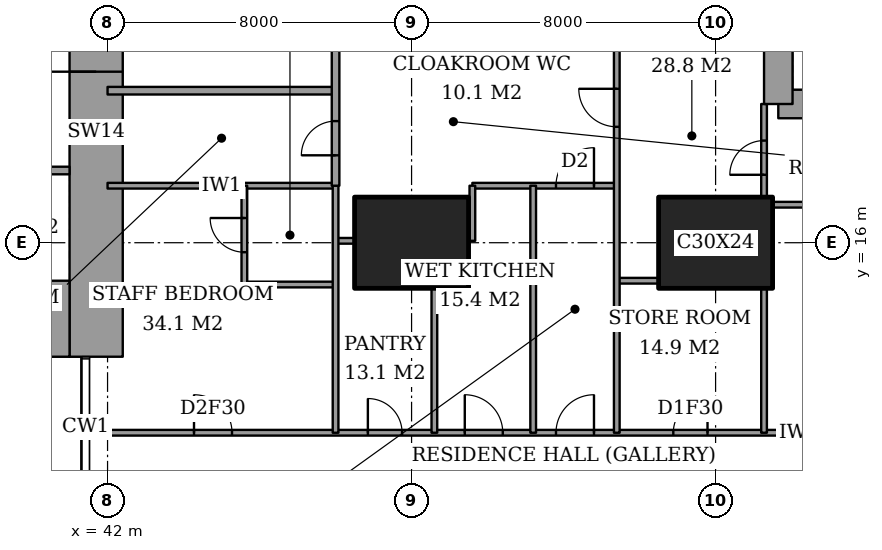
"""IFC4 building model, lengths in metres.
Left out: names, types, materials, properties, quantities, classifications, styles, units other than length and angle.
Written with IfcOpenShell. Run it as: python <this file> out.ifc"""

import sys

from ifc_helpers import new_model, si_unit, direction, frame, frame_2d, origin, origin_2d, place, context, subcontext, project, spatial, rectangle, extrude, element, fill, save


model = new_model("IFC4")
c1 = context("Model", 3, precision=1e-05, world=origin(), true_north=direction((0.0, 1.0)))
c2 = subcontext(c1, "Body", "Model", "MODEL_VIEW")
j1 = project(units=[si_unit("LENGTHUNIT", "METRE"), si_unit("PLANEANGLEUNIT", "RADIAN")], contexts=[c1])
p1 = place(None, origin())
s1 = spatial("IfcSite", under=j1, at=p1, CompositionType="ELEMENT")
p2 = place(p1, origin())
s2 = spatial("IfcBuilding", under=s1, at=p2, CompositionType="ELEMENT")
p3 = place(p2, frame((0.0, 0.0, 230.4)))
s3 = spatial("IfcBuildingStorey", under=s2, at=p3, CompositionType="ELEMENT", Elevation=230.4)
for number, where, z_axis, x_axis in (
    (1, (50.0, 16.0, 0.0), (0.0, 0.0, 1.0), (1.0, 0.0, 0.0)),
    (2, (58.0, 16.0, 0.0), (0.0, 0.0, 1.0), (1.0, 0.0, 0.0)),
):
    element("IfcColumn", number, at=place(p3, frame(where, z_axis=z_axis, x_axis=x_axis)), inside=s3, PredefinedType="COLUMN", context=c2, shape_type="SweptSolid", body=[
        extrude(rectangle(XDim=3.0, YDim=2.4, at=origin_2d()), origin(), (0.0, 0.0, 1.0), 3.6),
    ])
p4 = place(p3, frame((37.85, 14.0, 0.0), z_axis=(0.0, 0.0, 1.0), x_axis=(1.0, 0.0, 0.0)))
e3 = element("IfcWall", 3, at=p4, inside=s3, PredefinedType="SHEAR", context=c2, shape_type="SweptSolid", body=[
    extrude(rectangle(XDim=3.15, YDim=2.0, at=frame_2d((1.575, 0.0))), origin(), (0.0, 0.0, 1.0), 3.6),
])
p5 = place(p3, frame((41.7, 13.0, 0.0), z_axis=(0.0, 0.0, 1.0), x_axis=(0.0, 1.0, 0.0)))
e4 = element("IfcWall", 4, at=p5, inside=s3, PredefinedType="SHEAR", context=c2, shape_type="SweptSolid", body=[
    extrude(rectangle(XDim=11.85, YDim=1.4, at=frame_2d((5.925, 0.0))), origin(), (0.0, 0.0, 1.0), 3.6),
])
p6 = place(p5, frame((7.5, 0.0, 0.0)))
e5 = element("IfcOpeningElement", 5, at=p6, cuts=e4, PredefinedType="OPENING", context=c2, shape_type="SweptSolid", body=[
    extrude(rectangle(XDim=1.8, YDim=2.4, at=frame_2d((0.9, 1.2))), frame((0.0, 0.71, 0.0), z_axis=(0.0, -1.0, 0.0), x_axis=(1.0, 0.0, 0.0)), (0.0, 0.0, 1.0), 1.42),
])
p7 = place(p3, frame((59.65, 19.65, 0.0), z_axis=(0.0, 0.0, 1.0), x_axis=(1.0, 0.0, 0.0)))
e6 = element("IfcWall", 6, at=p7, inside=s3, PredefinedType="SHEAR", context=c2, shape_type="SweptSolid", body=[
    extrude(rectangle(XDim=4.45, YDim=0.75, at=frame_2d((2.225, 0.0))), origin(), (0.0, 0.0, 1.0), 3.6),
])
p8 = place(p3, frame((59.65, 28.35, 0.0), z_axis=(0.0, 0.0, 1.0), x_axis=(0.0, -1.0, 0.0)))
e7 = element("IfcWall", 7, at=p8, inside=s3, PredefinedType="SHEAR", context=c2, shape_type="SweptSolid", body=[
    extrude(rectangle(XDim=8.7, YDim=0.75, at=frame_2d((4.35, 0.0))), origin(), (0.0, 0.0, 1.0), 3.6),
])
p9 = place(p8, frame((0.975, 0.0, 0.0)))
e8 = element("IfcOpeningElement", 8, at=p9, cuts=e7, PredefinedType="OPENING", context=c2, shape_type="SweptSolid", body=[
    extrude(rectangle(XDim=1.0, YDim=2.1, at=frame_2d((0.5, 1.05))), frame((0.0, 0.385, 0.0), z_axis=(0.0, -1.0, 0.0), x_axis=(1.0, 0.0, 0.0)), (0.0, 0.0, 1.0), 0.77),
])
p10 = place(p3, frame((41.439, 11.0, 0.0), z_axis=(0.0, 0.0, 1.0), x_axis=(1.0, 0.0, 0.0)))
e9 = element("IfcWall", 9, at=p10, inside=s3, PredefinedType="PARTITIONING", context=c2, shape_type="SweptSolid", body=[
    extrude(rectangle(XDim=25.011, YDim=0.15, at=frame_2d((12.505, 0.0))), origin(), (0.0, 0.0, 1.0), 3.35),
])
p11 = place(p10, frame((12.361, 0.0, 0.0)))
e10 = element("IfcOpeningElement", 10, at=p11, cuts=e9, PredefinedType="OPENING", context=c2, shape_type="SweptSolid", body=[
    extrude(rectangle(XDim=1.0, YDim=2.1, at=frame_2d((0.5, 1.05))), frame((0.0, 0.085, 0.0), z_axis=(0.0, -1.0, 0.0), x_axis=(1.0, 0.0, 0.0)), (0.0, 0.0, 1.0), 0.17),
])
p12 = place(p10, frame((20.924, 0.0, 0.0)))
e11 = element("IfcOpeningElement", 11, at=p12, cuts=e9, PredefinedType="OPENING", context=c2, shape_type="SweptSolid", body=[
    extrude(rectangle(XDim=1.0, YDim=2.1, at=frame_2d((0.5, 1.05))), frame((0.0, 0.085, 0.0), z_axis=(0.0, -1.0, 0.0), x_axis=(1.0, 0.0, 0.0)), (0.0, 0.0, 1.0), 0.17),
])
p13 = place(p10, frame((15.448, 0.0, 0.0)))
e12 = element("IfcOpeningElement", 12, at=p13, cuts=e9, PredefinedType="OPENING", context=c2, shape_type="SweptSolid", body=[
    extrude(rectangle(XDim=0.9, YDim=2.1, at=frame_2d((0.45, 1.05))), frame((0.0, 0.085, 0.0), z_axis=(0.0, -1.0, 0.0), x_axis=(1.0, 0.0, 0.0)), (0.0, 0.0, 1.0), 0.17),
])
p14 = place(p10, frame((9.961, 0.0, 0.0)))
e13 = element("IfcOpeningElement", 13, at=p14, cuts=e9, PredefinedType="OPENING", context=c2, shape_type="SweptSolid", body=[
    extrude(rectangle(XDim=1.0, YDim=2.1, at=frame_2d((0.5, 1.05))), frame((0.0, 0.085, 0.0), z_axis=(0.0, -1.0, 0.0), x_axis=(1.0, 0.0, 0.0)), (0.0, 0.0, 1.0), 0.17),
])
p15 = place(p10, frame((7.411, 0.0, 0.0)))
e14 = element("IfcOpeningElement", 14, at=p15, cuts=e9, PredefinedType="OPENING", context=c2, shape_type="SweptSolid", body=[
    extrude(rectangle(XDim=0.9, YDim=2.1, at=frame_2d((0.45, 1.05))), frame((0.0, 0.085, 0.0), z_axis=(0.0, -1.0, 0.0), x_axis=(1.0, 0.0, 0.0)), (0.0, 0.0, 1.0), 0.17),
])
p16 = place(p10, frame((2.836, 0.0, 0.0)))
e15 = element("IfcOpeningElement", 15, at=p16, cuts=e9, PredefinedType="OPENING", context=c2, shape_type="SweptSolid", body=[
    extrude(rectangle(XDim=1.0, YDim=2.1, at=frame_2d((0.5, 1.05))), frame((0.0, 0.085, 0.0), z_axis=(0.0, -1.0, 0.0), x_axis=(1.0, 0.0, 0.0)), (0.0, 0.0, 1.0), 0.17),
])
p17 = place(p3, frame((45.6, 14.9, 0.0), z_axis=(0.0, 0.0, 1.0), x_axis=(1.0, 0.0, 0.0)))
e16 = element("IfcWall", 16, at=p17, inside=s3, PredefinedType="PARTITIONING", context=c2, shape_type="SweptSolid", body=[
    extrude(rectangle(XDim=2.4, YDim=0.15, at=frame_2d((1.2, 0.0))), origin(), (0.0, 0.0, 1.0), 3.35),
])
p18 = place(p3, frame((55.4, 15.0, 0.0), z_axis=(0.0, 0.0, 1.0), x_axis=(1.0, 0.0, 0.0)))
e17 = element("IfcWall", 17, at=p18, inside=s3, PredefinedType="PARTITIONING", context=c2, shape_type="SweptSolid", body=[
    extrude(rectangle(XDim=1.1, YDim=0.15, at=frame_2d((0.55, 0.0))), origin(), (0.0, 0.0, 1.0), 3.35),
])
p19 = place(p3, frame((48.0, 16.05, 0.0), z_axis=(0.0, 0.0, 1.0), x_axis=(1.0, 0.0, 0.0)))
e18 = element("IfcWall", 18, at=p19, inside=s3, PredefinedType="PARTITIONING", context=c2, shape_type="SweptSolid", body=[
    extrude(rectangle(XDim=0.5, YDim=0.15, at=frame_2d((0.25, 0.0))), origin(), (0.0, 0.0, 1.0), 2.634),
])
p20 = place(p3, frame((59.5, 17.0, 0.0), z_axis=(0.0, 0.0, 1.0), x_axis=(1.0, 0.0, 0.0)))
e19 = element("IfcWall", 19, at=p20, inside=s3, PredefinedType="PARTITIONING", context=c2, shape_type="SweptSolid", body=[
    extrude(rectangle(XDim=6.95, YDim=0.15, at=frame_2d((3.475, 0.0))), origin(), (0.0, 0.0, 1.0), 3.35),
])
p21 = place(p3, frame((42.0, 17.5, 0.0), z_axis=(0.0, 0.0, 1.0), x_axis=(1.0, 0.0, 0.0)))
e20 = element("IfcWall", 20, at=p21, inside=s3, PredefinedType="PARTITIONING", context=c2, shape_type="SweptSolid", body=[
    extrude(rectangle(XDim=6.0, YDim=0.15, at=frame_2d((3.0, 0.0))), origin(), (0.0, 0.0, 1.0), 3.35),
])
p22 = place(p3, frame((51.6, 17.5, 0.0), z_axis=(0.0, 0.0, 1.0), x_axis=(1.0, 0.0, 0.0)))
e21 = element("IfcWall", 21, at=p22, inside=s3, PredefinedType="PARTITIONING", context=c2, shape_type="SweptSolid", body=[
    extrude(rectangle(XDim=3.8, YDim=0.15, at=frame_2d((1.9, 0.0))), origin(), (0.0, 0.0, 1.0), 3.35),
])
p23 = place(p22, frame((2.2, 0.0, 0.0)))
e22 = element("IfcOpeningElement", 22, at=p23, cuts=e21, PredefinedType="OPENING", context=c2, shape_type="SweptSolid", body=[
    extrude(rectangle(XDim=1.0, YDim=2.1, at=frame_2d((0.5, 1.05))), frame((0.0, 0.085, 0.0), z_axis=(0.0, -1.0, 0.0), x_axis=(1.0, 0.0, 0.0)), (0.0, 0.0, 1.0), 0.17),
])
p24 = place(p3, frame((42.0, 20.0, 0.0), z_axis=(0.0, 0.0, 1.0), x_axis=(1.0, 0.0, 0.0)))
e23 = element("IfcWall", 23, at=p24, inside=s3, PredefinedType="PARTITIONING", context=c2, shape_type="SweptSolid", body=[
    extrude(rectangle(XDim=6.0, YDim=0.2, at=frame_2d((3.0, 0.0))), origin(), (0.0, 0.0, 1.0), 3.35),
])
p25 = place(p3, frame((45.6, 14.9, 0.0), z_axis=(0.0, 0.0, 1.0), x_axis=(0.0, 1.0, 0.0)))
e24 = element("IfcWall", 24, at=p25, inside=s3, PredefinedType="PARTITIONING", context=c2, shape_type="SweptSolid", body=[
    extrude(rectangle(XDim=2.6, YDim=0.15, at=frame_2d((1.3, 0.0))), origin(), (0.0, 0.0, 1.0), 3.35),
])
p26 = place(p25, frame((0.85, 0.0, 0.0)))
e25 = element("IfcOpeningElement", 25, at=p26, cuts=e24, PredefinedType="OPENING", context=c2, shape_type="SweptSolid", body=[
    extrude(rectangle(XDim=0.9, YDim=2.1, at=frame_2d((0.45, 1.05))), frame((0.0, 0.085, 0.0), z_axis=(0.0, -1.0, 0.0), x_axis=(1.0, 0.0, 0.0)), (0.0, 0.0, 1.0), 0.17),
])
p27 = place(p3, frame((48.0, 17.5, 0.0), z_axis=(0.0, 0.0, 1.0), x_axis=(0.0, 1.0, 0.0)))
e26 = element("IfcWall", 26, at=p27, inside=s3, PredefinedType="PARTITIONING", context=c2, shape_type="SweptSolid", body=[
    extrude(rectangle(XDim=6.5, YDim=0.2, at=frame_2d((3.25, 0.0))), origin(), (0.0, 0.0, 1.0), 3.35),
])
p28 = place(p27, frame((3.9, 0.0, 0.0)))
e27 = element("IfcOpeningElement", 27, at=p28, cuts=e26, PredefinedType="OPENING", context=c2, shape_type="SweptSolid", body=[
    extrude(rectangle(XDim=1.2, YDim=2.4, at=frame_2d((0.6, 1.2))), frame((0.0, 0.11, 0.0), z_axis=(0.0, -1.0, 0.0), x_axis=(1.0, 0.0, 0.0)), (0.0, 0.0, 1.0), 0.22),
])
p29 = place(p27, frame((0.8, 0.0, 0.0)))
e28 = element("IfcOpeningElement", 28, at=p29, cuts=e26, PredefinedType="OPENING", context=c2, shape_type="SweptSolid", body=[
    extrude(rectangle(XDim=0.9, YDim=2.1, at=frame_2d((0.45, 1.05))), frame((0.0, 0.11, 0.0), z_axis=(0.0, -1.0, 0.0), x_axis=(1.0, 0.0, 0.0)), (0.0, 0.0, 1.0), 0.22),
])
p30 = place(p3, frame((48.0, 11.0, 0.0), z_axis=(0.0, 0.0, 1.0), x_axis=(0.0, 1.0, 0.0)))
e29 = element("IfcWall", 29, at=p30, inside=s3, PredefinedType="PARTITIONING", context=c2, shape_type="SweptSolid", body=[
    extrude(rectangle(XDim=6.5, YDim=0.15, at=frame_2d((3.25, 0.0))), origin(), (0.0, 0.0, 1.0), 3.35),
])
p31 = place(p3, frame((50.6, 11.0, 0.0), z_axis=(0.0, 0.0, 1.0), x_axis=(0.0, 1.0, 0.0)))
e30 = element("IfcWall", 30, at=p31, inside=s3, PredefinedType="PARTITIONING", context=c2, shape_type="SweptSolid", body=[
    extrude(rectangle(XDim=3.8, YDim=0.15, at=frame_2d((1.9, 0.0))), origin(), (0.0, 0.0, 1.0), 3.35),
])
p32 = place(p3, frame((51.6, 16.05, 0.0), z_axis=(0.0, 0.0, 1.0), x_axis=(0.0, 1.0, 0.0)))
e31 = element("IfcWall", 31, at=p32, inside=s3, PredefinedType="PARTITIONING", context=c2, shape_type="SweptSolid", body=[
    extrude(rectangle(XDim=1.45, YDim=0.15, at=frame_2d((0.725, 0.0))), origin(), (0.0, 0.0, 1.0), 3.35),
])
p33 = place(p3, frame((53.2, 11.0, 0.0), z_axis=(0.0, 0.0, 1.0), x_axis=(0.0, 1.0, 0.0)))
e32 = element("IfcWall", 32, at=p33, inside=s3, PredefinedType="PARTITIONING", context=c2, shape_type="SweptSolid", body=[
    extrude(rectangle(XDim=6.5, YDim=0.15, at=frame_2d((3.25, 0.0))), origin(), (0.0, 0.0, 1.0), 3.35),
])
p34 = place(p3, frame((55.4, 11.0, 0.0), z_axis=(0.0, 0.0, 1.0), x_axis=(0.0, 1.0, 0.0)))
e33 = element("IfcWall", 33, at=p34, inside=s3, PredefinedType="PARTITIONING", context=c2, shape_type="SweptSolid", body=[
    extrude(rectangle(XDim=10.6, YDim=0.15, at=frame_2d((5.3, 0.0))), origin(), (0.0, 0.0, 1.0), 3.35),
])
p35 = place(p34, frame((8.05, 0.0, 0.0)))
e34 = element("IfcOpeningElement", 34, at=p35, cuts=e33, PredefinedType="OPENING", context=c2, shape_type="SweptSolid", body=[
    extrude(rectangle(XDim=1.0, YDim=2.1, at=frame_2d((0.5, 1.05))), frame((0.0, 0.085, 0.0), z_axis=(0.0, -1.0, 0.0), x_axis=(1.0, 0.0, 0.0)), (0.0, 0.0, 1.0), 0.17),
])
p36 = place(p3, frame((59.275, 11.0, 0.0), z_axis=(0.0, 0.0, 1.0), x_axis=(0.0, 1.0, 0.0)))
e35 = element("IfcWall", 35, at=p36, inside=s3, PredefinedType="PARTITIONING", context=c2, shape_type="SweptSolid", body=[
    extrude(rectangle(XDim=3.8, YDim=0.15, at=frame_2d((1.9, 0.0))), origin(), (0.0, 0.0, 1.0), 3.35),
])
p37 = place(p3, frame((59.275, 17.2, 0.0), z_axis=(0.0, 0.0, 1.0), x_axis=(0.0, 1.0, 0.0)))
e36 = element("IfcWall", 36, at=p37, inside=s3, PredefinedType="PARTITIONING", context=c2, shape_type="SweptSolid", body=[
    extrude(rectangle(XDim=2.45, YDim=0.15, at=frame_2d((1.225, 0.0))), origin(), (0.0, 0.0, 1.0), 3.35),
])
p38 = place(p37, frame((0.587, 0.0, 0.0)))
e37 = element("IfcOpeningElement", 37, at=p38, cuts=e36, PredefinedType="OPENING", context=c2, shape_type="SweptSolid", body=[
    extrude(rectangle(XDim=0.9, YDim=2.1, at=frame_2d((0.45, 1.05))), frame((0.0, 0.085, 0.0), z_axis=(0.0, -1.0, 0.0), x_axis=(1.0, 0.0, 0.0)), (0.0, 0.0, 1.0), 0.17),
])
p39 = place(p3, frame((28.3, 17.9, 0.0), z_axis=(0.0, 0.0, 1.0), x_axis=(1.0, 0.0, 0.0)))
e38 = element("IfcWall", 38, at=p39, inside=s3, PredefinedType="PARTITIONING", context=c2, shape_type="SweptSolid", body=[
    extrude(rectangle(XDim=12.7, YDim=0.2, at=frame_2d((6.35, 0.0))), origin(), (0.0, 0.0, 1.0), 3.6),
])
p40 = place(p39, frame((1.05, 0.0, 0.0)))
e39 = element("IfcOpeningElement", 39, at=p40, cuts=e38, PredefinedType="OPENING", context=c2, shape_type="SweptSolid", body=[
    extrude(rectangle(XDim=0.9, YDim=2.1, at=frame_2d((0.45, 1.05))), frame((0.0, 0.11, 0.0), z_axis=(0.0, -1.0, 0.0), x_axis=(1.0, 0.0, 0.0)), (0.0, 0.0, 1.0), 0.22),
])
p41 = place(p39, frame((4.25, 0.0, 0.0)))
e40 = element("IfcOpeningElement", 40, at=p41, cuts=e38, PredefinedType="OPENING", context=c2, shape_type="SweptSolid", body=[
    extrude(rectangle(XDim=0.9, YDim=2.1, at=frame_2d((0.45, 1.05))), frame((0.0, 0.11, 0.0), z_axis=(0.0, -1.0, 0.0), x_axis=(1.0, 0.0, 0.0)), (0.0, 0.0, 1.0), 0.22),
])
p42 = place(p39, frame((10.6, 0.0, 0.0)))
e41 = element("IfcOpeningElement", 41, at=p42, cuts=e38, PredefinedType="OPENING", context=c2, shape_type="SweptSolid", body=[
    extrude(rectangle(XDim=1.2, YDim=2.1, at=frame_2d((0.6, 1.05))), frame((0.0, 0.11, 0.0), z_axis=(0.0, -1.0, 0.0), x_axis=(1.0, 0.0, 0.0)), (0.0, 0.0, 1.0), 0.22),
])
p43 = place(p11, origin())
e42 = element("IfcDoor", 42, at=p43, inside=s3, OperationType="SINGLE_SWING_LEFT", PredefinedType="DOOR", context=c2, shape_type="SweptSolid", body=[
    extrude(rectangle(XDim=1.0, YDim=2.1, at=frame_2d((0.5, 1.05))), frame((0.0, 0.025, 0.0), z_axis=(0.0, -1.0, 0.0), x_axis=(1.0, 0.0, 0.0)), (0.0, 0.0, 1.0), 0.05),
])
fill(e10, e42)
p44 = place(p38, origin())
e43 = element("IfcDoor", 43, at=p44, inside=s3, OperationType="SINGLE_SWING_RIGHT", PredefinedType="DOOR", context=c2, shape_type="SweptSolid", body=[
    extrude(rectangle(XDim=0.9, YDim=2.1, at=frame_2d((0.45, 1.05))), frame((0.0, 0.025, 0.0), z_axis=(0.0, -1.0, 0.0), x_axis=(1.0, 0.0, 0.0)), (0.0, 0.0, 1.0), 0.05),
])
fill(e37, e43)
p45 = place(p13, origin())
e44 = element("IfcDoor", 44, at=p45, inside=s3, OperationType="SINGLE_SWING_LEFT", PredefinedType="DOOR", context=c2, shape_type="SweptSolid", body=[
    extrude(rectangle(XDim=0.9, YDim=2.1, at=frame_2d((0.45, 1.05))), frame((0.0, 0.025, 0.0), z_axis=(0.0, -1.0, 0.0), x_axis=(1.0, 0.0, 0.0)), (0.0, 0.0, 1.0), 0.05),
])
fill(e12, e44)
p46 = place(p35, origin())
e45 = element("IfcDoor", 45, at=p46, inside=s3, OperationType="SINGLE_SWING_LEFT", PredefinedType="DOOR", context=c2, shape_type="SweptSolid", body=[
    extrude(rectangle(XDim=1.0, YDim=2.1, at=frame_2d((0.5, 1.05))), frame((0.0, 0.025, 0.0), z_axis=(0.0, -1.0, 0.0), x_axis=(1.0, 0.0, 0.0)), (0.0, 0.0, 1.0), 0.05),
])
fill(e34, e45)
p47 = place(p23, origin())
e46 = element("IfcDoor", 46, at=p47, inside=s3, OperationType="SINGLE_SWING_LEFT", PredefinedType="DOOR", context=c2, shape_type="SweptSolid", body=[
    extrude(rectangle(XDim=1.0, YDim=2.1, at=frame_2d((0.5, 1.05))), frame((0.0, 0.025, 0.0), z_axis=(0.0, -1.0, 0.0), x_axis=(1.0, 0.0, 0.0)), (0.0, 0.0, 1.0), 0.05),
])
fill(e22, e46)
p48 = place(p14, origin())
e47 = element("IfcDoor", 47, at=p48, inside=s3, OperationType="SINGLE_SWING_RIGHT", PredefinedType="DOOR", context=c2, shape_type="SweptSolid", body=[
    extrude(rectangle(XDim=1.0, YDim=2.1, at=frame_2d((0.5, 1.05))), frame((0.0, 0.025, 0.0), z_axis=(0.0, -1.0, 0.0), x_axis=(1.0, 0.0, 0.0)), (0.0, 0.0, 1.0), 0.05),
])
fill(e13, e47)
p49 = place(p15, origin())
e48 = element("IfcDoor", 48, at=p49, inside=s3, OperationType="SINGLE_SWING_RIGHT", PredefinedType="DOOR", context=c2, shape_type="SweptSolid", body=[
    extrude(rectangle(XDim=0.9, YDim=2.1, at=frame_2d((0.45, 1.05))), frame((0.0, 0.025, 0.0), z_axis=(0.0, -1.0, 0.0), x_axis=(1.0, 0.0, 0.0)), (0.0, 0.0, 1.0), 0.05),
])
fill(e14, e48)
p50 = place(p26, origin())
e49 = element("IfcDoor", 49, at=p50, inside=s3, OperationType="SINGLE_SWING_LEFT", PredefinedType="DOOR", context=c2, shape_type="SweptSolid", body=[
    extrude(rectangle(XDim=0.9, YDim=2.1, at=frame_2d((0.45, 1.05))), frame((0.0, 0.025, 0.0), z_axis=(0.0, -1.0, 0.0), x_axis=(1.0, 0.0, 0.0)), (0.0, 0.0, 1.0), 0.05),
])
fill(e25, e49)
p51 = place(p16, origin())
e50 = element("IfcDoor", 50, at=p51, inside=s3, OperationType="SINGLE_SWING_RIGHT", PredefinedType="DOOR", context=c2, shape_type="SweptSolid", body=[
    extrude(rectangle(XDim=1.0, YDim=2.1, at=frame_2d((0.5, 1.05))), frame((0.0, 0.025, 0.0), z_axis=(0.0, -1.0, 0.0), x_axis=(1.0, 0.0, 0.0)), (0.0, 0.0, 1.0), 0.05),
])
fill(e15, e50)
p52 = place(p29, origin())
e51 = element("IfcDoor", 51, at=p52, inside=s3, OperationType="SINGLE_SWING_RIGHT", PredefinedType="DOOR", context=c2, shape_type="SweptSolid", body=[
    extrude(rectangle(XDim=0.9, YDim=2.1, at=frame_2d((0.45, 1.05))), frame((0.0, 0.025, 0.0), z_axis=(0.0, -1.0, 0.0), x_axis=(1.0, 0.0, 0.0)), (0.0, 0.0, 1.0), 0.05),
])
fill(e28, e51)
p53 = place(p6, origin())
e52 = element("IfcDoor", 52, at=p53, inside=s3, OperationType="DOUBLE_DOOR_DOUBLE_SWING", PredefinedType="DOOR", context=c2, shape_type="SweptSolid", body=[
    extrude(rectangle(XDim=1.8, YDim=2.4, at=frame_2d((0.9, 1.2))), frame((0.0, 0.025, 0.0), z_axis=(0.0, -1.0, 0.0), x_axis=(1.0, 0.0, 0.0)), (0.0, 0.0, 1.0), 0.05),
])
fill(e5, e52)
save(model, sys.argv[1])
